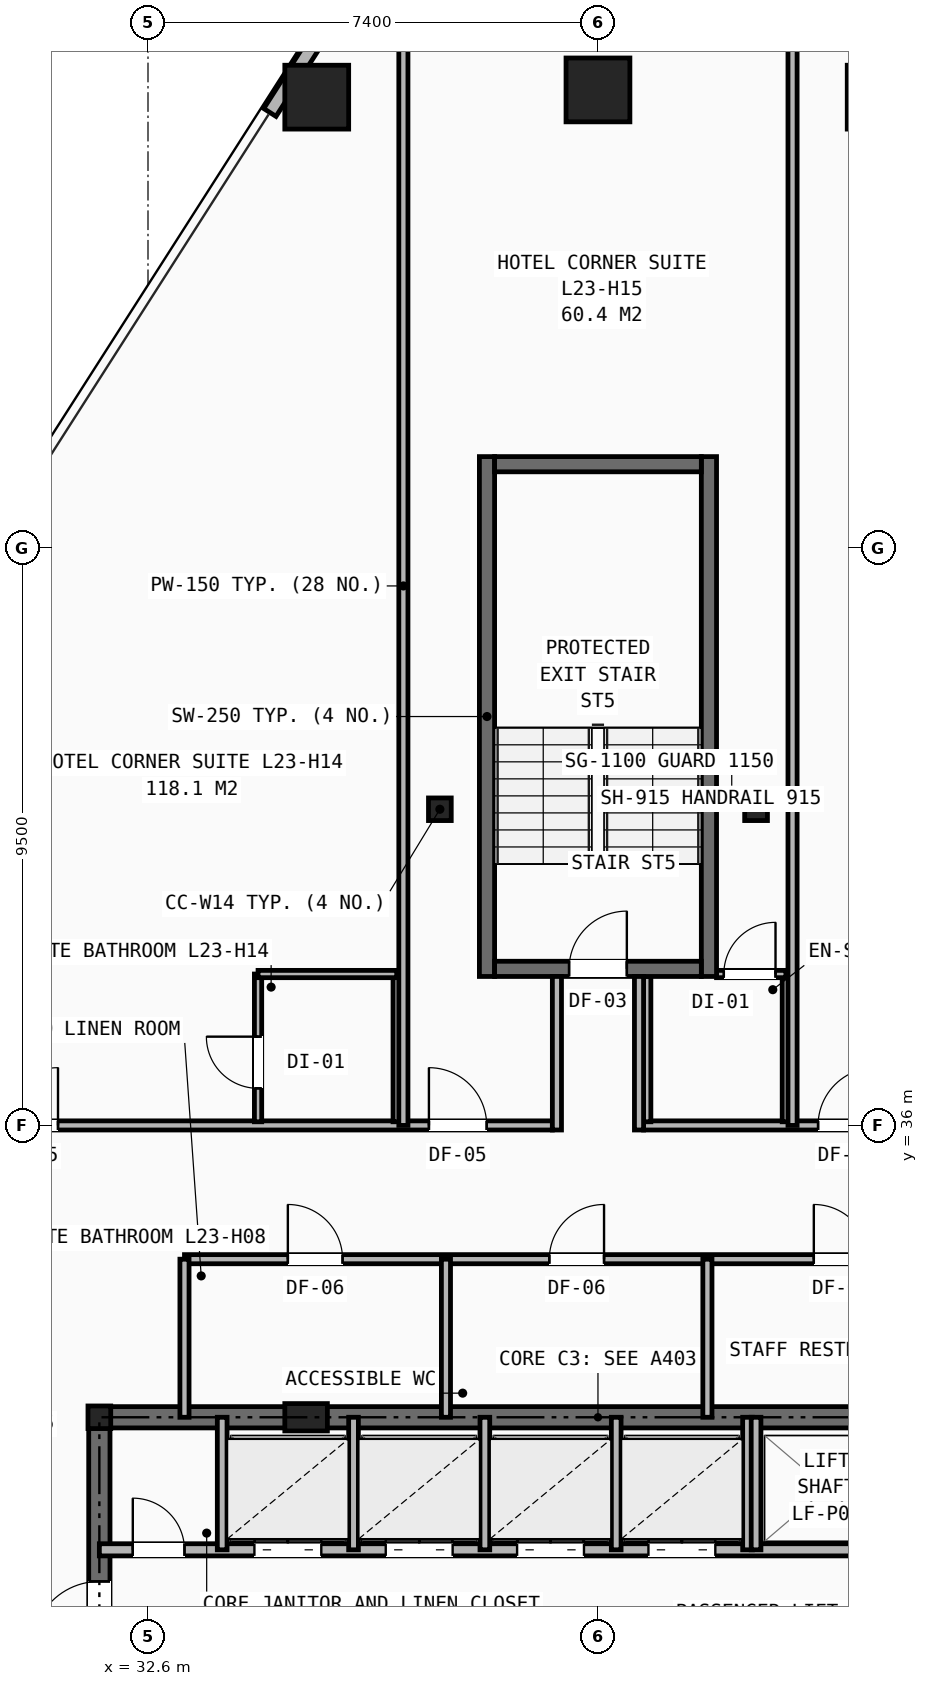
"""IFC4 building model, lengths in metres.
Left out: names, types, materials, properties, quantities, classifications, styles, units other than length and angle.
Written with IfcOpenShell. Run it as: python <this file> out.ifc"""

import sys

from ifc_helpers import new_model, si_unit, direction, frame, frame_2d, origin, origin_2d, place, context, subcontext, project, spatial, rectangle, hollow_rectangle, i_section, extrude, element, fill, save


model = new_model("IFC4")
c1 = context("Model", 3, precision=1e-05, world=origin(), true_north=direction((0.0, 1.0)))
c2 = subcontext(c1, "Body", "Model", "MODEL_VIEW")
j1 = project(units=[si_unit("LENGTHUNIT", "METRE"), si_unit("PLANEANGLEUNIT", "RADIAN")], contexts=[c1])
p1 = place(None, origin())
s1 = spatial("IfcSite", under=j1, at=p1, CompositionType="ELEMENT")
p2 = place(p1, origin())
s2 = spatial("IfcBuilding", under=s1, at=p2, CompositionType="ELEMENT")
p3 = place(p2, frame((0.0, 0.0, 83.0)))
s3 = spatial("IfcBuildingStorey", under=s2, at=p3, CompositionType="ELEMENT", Elevation=83.0)
for number, where, z_axis, x_axis in (
    (1, (31.8, 31.2, 0.0), (0.0, 0.0, 1.0), (1.0, 0.0, 0.0)),
    (2, (37.4, 41.2, 0.0), (0.0, 0.0, 1.0), (1.0, 0.0, 0.0)),
    (3, (42.6, 41.2, 0.0), (0.0, 0.0, 1.0), (1.0, 0.0, 0.0)),
):
    element("IfcColumn", number, at=place(p3, frame(where, z_axis=z_axis, x_axis=x_axis)), inside=s3, PredefinedType="COLUMN", context=c2, shape_type="SweptSolid", body=[
        extrude(i_section(OverallWidth=0.374, OverallDepth=0.372, WebThickness=0.016, FlangeThickness=0.026, at=origin_2d()), origin(), (0.0, 0.0, 1.0), 3.2),
    ])
p4 = place(p3, frame((35.2, 31.2, 0.0), z_axis=(0.0, 0.0, 1.0), x_axis=(1.0, 0.0, 0.0)))
e4 = element("IfcColumn", 4, at=p4, inside=s3, PredefinedType="PILASTER", context=c2, shape_type="SweptSolid", body=[
    extrude(rectangle(XDim=0.7, YDim=0.45, at=origin_2d()), origin(), (0.0, 0.0, 1.0), 3.2),
])
for number, where, z_axis, x_axis in (
    (5, (44.625, 52.912, 0.0), (0.0, 0.0, 1.0), (1.0, 0.0, 0.0)),
    (6, (40.0, 53.031, 0.0), (0.0, 0.0, 1.0), (1.0, 0.0, 0.0)),
    (7, (35.375, 52.912, 0.0), (0.0, 0.0, 1.0), (1.0, 0.0, 0.0)),
):
    element("IfcColumn", number, at=place(p3, frame(where, z_axis=z_axis, x_axis=x_axis)), inside=s3, PredefinedType="COLUMN", context=c2, shape_type="SweptSolid", body=[
        extrude(hollow_rectangle(XDim=1.05, YDim=1.05, WallThickness=0.07, at=origin_2d()), origin(), (0.0, 0.0, 1.0), 3.2),
    ])
p5 = place(p3, frame((35.314, 53.769, 0.0), z_axis=(0.0, 0.0, 1.0), x_axis=(-0.538937912301, -0.842345491283, 0.0)))
e8 = element("IfcWall", 8, at=p5, inside=s3, PredefinedType="SHEAR", context=c2, shape_type="SweptSolid", body=[
    extrude(rectangle(XDim=1.316, YDim=0.24, at=frame_2d((0.658, 0.0))), origin(), (0.0, 0.0, 1.0), 2.253),
])
p6 = place(p3, frame((31.8, 31.2, 0.0), z_axis=(0.0, 0.0, 1.0), x_axis=(1.0, 0.0, 0.0)))
e9 = element("IfcWall", 9, at=p6, inside=s3, PredefinedType="SHEAR", context=c2, shape_type="SweptSolid", body=[
    extrude(rectangle(XDim=16.4, YDim=0.35, at=frame_2d((8.2, 0.0))), origin(), (0.0, 0.0, 1.0), 2.97),
])
p7 = place(p3, frame((31.8, 16.4, 0.0), z_axis=(0.0, 0.0, 1.0), x_axis=(0.0, 1.0, 0.0)))
e10 = element("IfcWall", 10, at=p7, inside=s3, PredefinedType="SHEAR", context=c2, shape_type="SweptSolid", body=[
    extrude(rectangle(XDim=14.8, YDim=0.35, at=frame_2d((7.4, 0.0))), origin(), (0.0, 0.0, 1.0), 2.97),
])
p8 = place(p7, frame((11.0, 0.0, 0.0)))
e11 = element("IfcOpeningElement", 11, at=p8, cuts=e10, PredefinedType="OPENING", context=c2, shape_type="SweptSolid", body=[
    extrude(rectangle(XDim=1.1, YDim=2.15, at=frame_2d((0.55, 1.075))), frame((0.0, 0.185, 0.0), z_axis=(0.0, -1.0, 0.0), x_axis=(1.0, 0.0, 0.0)), (0.0, 0.0, 1.0), 0.37),
])
p9 = place(p3, frame((31.8, 29.02, 0.0), z_axis=(0.0, 0.0, 1.0), x_axis=(1.0, 0.0, 0.0)))
e12 = element("IfcWall", 12, at=p9, inside=s3, PredefinedType="SOLIDWALL", context=c2, shape_type="SweptSolid", body=[
    extrude(rectangle(XDim=16.4, YDim=0.2, at=frame_2d((8.2, 0.0))), origin(), (0.0, 0.0, 1.0), 2.421),
])
p10 = place(p9, frame((0.55, 0.0, 0.0)))
e13 = element("IfcOpeningElement", 13, at=p10, cuts=e12, PredefinedType="OPENING", context=c2, shape_type="SweptSolid", body=[
    extrude(rectangle(XDim=0.85, YDim=2.05, at=frame_2d((0.425, 1.025))), frame((0.0, 0.11, 0.0), z_axis=(0.0, -1.0, 0.0), x_axis=(1.0, 0.0, 0.0)), (0.0, 0.0, 1.0), 0.22),
])
p11 = place(p9, frame((2.55, 0.0, 0.0)))
e14 = element("IfcOpeningElement", 14, at=p11, cuts=e12, PredefinedType="OPENING", context=c2, shape_type="SweptSolid", body=[
    extrude(rectangle(XDim=1.1, YDim=2.15, at=frame_2d((0.55, 1.075))), frame((0.0, 0.11, 0.0), z_axis=(0.0, -1.0, 0.0), x_axis=(1.0, 0.0, 0.0)), (0.0, 0.0, 1.0), 0.22),
])
p12 = place(p9, frame((4.71, 0.0, 0.0)))
e15 = element("IfcOpeningElement", 15, at=p12, cuts=e12, PredefinedType="OPENING", context=c2, shape_type="SweptSolid", body=[
    extrude(rectangle(XDim=1.1, YDim=2.15, at=frame_2d((0.55, 1.075))), frame((0.0, 0.11, 0.0), z_axis=(0.0, -1.0, 0.0), x_axis=(1.0, 0.0, 0.0)), (0.0, 0.0, 1.0), 0.22),
])
p13 = place(p9, frame((6.87, 0.0, 0.0)))
e16 = element("IfcOpeningElement", 16, at=p13, cuts=e12, PredefinedType="OPENING", context=c2, shape_type="SweptSolid", body=[
    extrude(rectangle(XDim=1.1, YDim=2.15, at=frame_2d((0.55, 1.075))), frame((0.0, 0.11, 0.0), z_axis=(0.0, -1.0, 0.0), x_axis=(1.0, 0.0, 0.0)), (0.0, 0.0, 1.0), 0.22),
])
p14 = place(p9, frame((9.03, 0.0, 0.0)))
e17 = element("IfcOpeningElement", 17, at=p14, cuts=e12, PredefinedType="OPENING", context=c2, shape_type="SweptSolid", body=[
    extrude(rectangle(XDim=1.1, YDim=2.15, at=frame_2d((0.55, 1.075))), frame((0.0, 0.11, 0.0), z_axis=(0.0, -1.0, 0.0), x_axis=(1.0, 0.0, 0.0)), (0.0, 0.0, 1.0), 0.22),
])
for number, where, z_axis, x_axis in (
    (18, (33.82, 29.02, 0.0), (0.0, 0.0, 1.0), (0.0, 1.0, 0.0)),
    (19, (35.98, 29.02, 0.0), (0.0, 0.0, 1.0), (0.0, 1.0, 0.0)),
    (20, (38.14, 29.02, 0.0), (0.0, 0.0, 1.0), (0.0, 1.0, 0.0)),
    (21, (40.3, 29.02, 0.0), (0.0, 0.0, 1.0), (0.0, 1.0, 0.0)),
    (22, (42.46, 29.02, 0.0), (0.0, 0.0, 1.0), (0.0, 1.0, 0.0)),
    (23, (42.6, 29.02, 0.0), (0.0, 0.0, 1.0), (0.0, 1.0, 0.0)),
):
    element("IfcWall", number, at=place(p3, frame(where, z_axis=z_axis, x_axis=x_axis)), inside=s3, PredefinedType="SOLIDWALL", context=c2, shape_type="SweptSolid", body=[
        extrude(rectangle(XDim=2.18, YDim=0.16, at=frame_2d((1.09, 0.0))), origin(), (0.0, 0.0, 1.0), 2.421),
    ])
p15 = place(p3, frame((33.2, 33.8, 0.0), z_axis=(0.0, 0.0, 1.0), x_axis=(1.0, 0.0, 0.0)))
e24 = element("IfcWall", 24, at=p15, inside=s3, PredefinedType="PARTITIONING", context=c2, shape_type="SweptSolid", body=[
    extrude(rectangle(XDim=13.0, YDim=0.15, at=frame_2d((6.5, 0.0))), origin(), (0.0, 0.0, 1.0), 2.97),
])
p16 = place(p15, frame((1.7, 0.0, 0.0)))
e25 = element("IfcOpeningElement", 25, at=p16, cuts=e24, PredefinedType="OPENING", context=c2, shape_type="SweptSolid", body=[
    extrude(rectangle(XDim=0.9, YDim=2.1, at=frame_2d((0.45, 1.05))), frame((0.0, 0.085, 0.0), z_axis=(0.0, -1.0, 0.0), x_axis=(1.0, 0.0, 0.0)), (0.0, 0.0, 1.0), 0.17),
])
p17 = place(p15, frame((6.0, 0.0, 0.0)))
e26 = element("IfcOpeningElement", 26, at=p17, cuts=e24, PredefinedType="OPENING", context=c2, shape_type="SweptSolid", body=[
    extrude(rectangle(XDim=0.9, YDim=2.1, at=frame_2d((0.45, 1.05))), frame((0.0, 0.085, 0.0), z_axis=(0.0, -1.0, 0.0), x_axis=(1.0, 0.0, 0.0)), (0.0, 0.0, 1.0), 0.17),
])
p18 = place(p15, frame((10.35, 0.0, 0.0)))
e27 = element("IfcOpeningElement", 27, at=p18, cuts=e24, PredefinedType="OPENING", context=c2, shape_type="SweptSolid", body=[
    extrude(rectangle(XDim=0.9, YDim=2.1, at=frame_2d((0.45, 1.05))), frame((0.0, 0.085, 0.0), z_axis=(0.0, -1.0, 0.0), x_axis=(1.0, 0.0, 0.0)), (0.0, 0.0, 1.0), 0.17),
])
for number, where, z_axis, x_axis in (
    (28, (33.2, 31.2, 0.0), (0.0, 0.0, 1.0), (0.0, 1.0, 0.0)),
    (29, (37.5, 31.2, 0.0), (0.0, 0.0, 1.0), (0.0, 1.0, 0.0)),
    (30, (41.8, 31.2, 0.0), (0.0, 0.0, 1.0), (0.0, 1.0, 0.0)),
):
    element("IfcWall", number, at=place(p3, frame(where, z_axis=z_axis, x_axis=x_axis)), inside=s3, PredefinedType="PARTITIONING", context=c2, shape_type="SweptSolid", body=[
        extrude(rectangle(XDim=2.6, YDim=0.15, at=frame_2d((1.3, 0.0))), origin(), (0.0, 0.0, 1.0), 2.421),
    ])
p19 = place(p3, frame((29.6, 36.0, 0.0), z_axis=(0.0, 0.0, 1.0), x_axis=(1.0, 0.0, 0.0)))
e31 = element("IfcWall", 31, at=p19, inside=s3, PredefinedType="PARTITIONING", context=c2, shape_type="SweptSolid", body=[
    extrude(rectangle(XDim=9.65, YDim=0.15, at=frame_2d((4.825, 0.0))), origin(), (0.0, 0.0, 1.0), 2.503),
])
p20 = place(p19, frame((0.57, 0.0, 0.0)))
e32 = element("IfcOpeningElement", 32, at=p20, cuts=e31, PredefinedType="OPENING", context=c2, shape_type="SweptSolid", body=[
    extrude(rectangle(XDim=0.95, YDim=2.1, at=frame_2d((0.475, 1.05))), frame((0.0, 0.085, 0.0), z_axis=(0.0, -1.0, 0.0), x_axis=(1.0, 0.0, 0.0)), (0.0, 0.0, 1.0), 0.17),
])
p21 = place(p19, frame((7.62, 0.0, 0.0)))
e33 = element("IfcOpeningElement", 33, at=p21, cuts=e31, PredefinedType="OPENING", context=c2, shape_type="SweptSolid", body=[
    extrude(rectangle(XDim=0.95, YDim=2.1, at=frame_2d((0.475, 1.05))), frame((0.0, 0.085, 0.0), z_axis=(0.0, -1.0, 0.0), x_axis=(1.0, 0.0, 0.0)), (0.0, 0.0, 1.0), 0.17),
])
p22 = place(p3, frame((40.75, 36.0, 0.0), z_axis=(0.0, 0.0, 1.0), x_axis=(1.0, 0.0, 0.0)))
e34 = element("IfcWall", 34, at=p22, inside=s3, PredefinedType="PARTITIONING", context=c2, shape_type="SweptSolid", body=[
    extrude(rectangle(XDim=9.65, YDim=0.15, at=frame_2d((4.825, 0.0))), origin(), (0.0, 0.0, 1.0), 2.503),
])
p23 = place(p22, frame((2.87, 0.0, 0.0)))
e35 = element("IfcOpeningElement", 35, at=p23, cuts=e34, PredefinedType="OPENING", context=c2, shape_type="SweptSolid", body=[
    extrude(rectangle(XDim=0.95, YDim=2.1, at=frame_2d((0.475, 1.05))), frame((0.0, 0.085, 0.0), z_axis=(0.0, -1.0, 0.0), x_axis=(1.0, 0.0, 0.0)), (0.0, 0.0, 1.0), 0.17),
])
p24 = place(p3, frame((34.41, 36.06, 0.0), z_axis=(0.0, 0.0, 1.0), x_axis=(0.0, 1.0, 0.0)))
e36 = element("IfcWall", 36, at=p24, inside=s3, PredefinedType="PARTITIONING", context=c2, shape_type="SweptSolid", body=[
    extrude(rectangle(XDim=2.43, YDim=0.12, at=frame_2d((1.215, 0.0))), origin(), (0.0, 0.0, 1.0), 2.97),
])
p25 = place(p24, frame((0.55, 0.0, 0.0)))
e37 = element("IfcOpeningElement", 37, at=p25, cuts=e36, PredefinedType="OPENING", context=c2, shape_type="SweptSolid", body=[
    extrude(rectangle(XDim=0.85, YDim=2.05, at=frame_2d((0.425, 1.025))), frame((0.0, 0.07, 0.0), z_axis=(0.0, -1.0, 0.0), x_axis=(1.0, 0.0, 0.0)), (0.0, 0.0, 1.0), 0.14),
])
p26 = place(p3, frame((36.69, 36.06, 0.0), z_axis=(0.0, 0.0, 1.0), x_axis=(0.0, 1.0, 0.0)))
e38 = element("IfcWall", 38, at=p26, inside=s3, PredefinedType="PARTITIONING", context=c2, shape_type="SweptSolid", body=[
    extrude(rectangle(XDim=2.43, YDim=0.12, at=frame_2d((1.215, 0.0))), origin(), (0.0, 0.0, 1.0), 2.97),
])
p27 = place(p3, frame((34.41, 38.49, 0.0), z_axis=(0.0, 0.0, 1.0), x_axis=(1.0, 0.0, 0.0)))
e39 = element("IfcWall", 39, at=p27, inside=s3, PredefinedType="PARTITIONING", context=c2, shape_type="SweptSolid", body=[
    extrude(rectangle(XDim=2.28, YDim=0.12, at=frame_2d((1.14, 0.0))), origin(), (0.0, 0.0, 1.0), 2.97),
])
p28 = place(p3, frame((36.8, 36.0, 0.0), z_axis=(0.0, 0.0, 1.0), x_axis=(0.0, 1.0, 0.0)))
e40 = element("IfcWall", 40, at=p28, inside=s3, PredefinedType="PARTITIONING", context=c2, shape_type="SweptSolid", body=[
    extrude(rectangle(XDim=17.746, YDim=0.15, at=frame_2d((8.873, 0.0))), origin(), (0.0, 0.0, 1.0), 2.258),
])
p29 = place(p3, frame((40.81, 36.06, 0.0), z_axis=(0.0, 0.0, 1.0), x_axis=(0.0, 1.0, 0.0)))
e41 = element("IfcWall", 41, at=p29, inside=s3, PredefinedType="PARTITIONING", context=c2, shape_type="SweptSolid", body=[
    extrude(rectangle(XDim=2.39, YDim=0.12, at=frame_2d((1.195, 0.0))), origin(), (0.0, 0.0, 1.0), 2.97),
])
p30 = place(p3, frame((43.09, 36.06, 0.0), z_axis=(0.0, 0.0, 1.0), x_axis=(0.0, 1.0, 0.0)))
e42 = element("IfcWall", 42, at=p30, inside=s3, PredefinedType="PARTITIONING", context=c2, shape_type="SweptSolid", body=[
    extrude(rectangle(XDim=2.43, YDim=0.12, at=frame_2d((1.215, 0.0))), origin(), (0.0, 0.0, 1.0), 2.97),
])
p31 = place(p3, frame((41.95, 38.49, 0.0), z_axis=(0.0, 0.0, 1.0), x_axis=(1.0, 0.0, 0.0)))
e43 = element("IfcWall", 43, at=p31, inside=s3, PredefinedType="PARTITIONING", context=c2, shape_type="SweptSolid", body=[
    extrude(rectangle(XDim=1.14, YDim=0.12, at=frame_2d((0.57, 0.0))), origin(), (0.0, 0.0, 1.0), 2.97),
])
p32 = place(p31, frame((0.12, 0.0, 0.0)))
e44 = element("IfcOpeningElement", 44, at=p32, cuts=e43, PredefinedType="OPENING", context=c2, shape_type="SweptSolid", body=[
    extrude(rectangle(XDim=0.85, YDim=2.05, at=frame_2d((0.425, 1.025))), frame((0.0, 0.07, 0.0), z_axis=(0.0, -1.0, 0.0), x_axis=(1.0, 0.0, 0.0)), (0.0, 0.0, 1.0), 0.14),
])
p33 = place(p3, frame((43.2, 36.0, 0.0), z_axis=(0.0, 0.0, 1.0), x_axis=(0.0, 1.0, 0.0)))
e45 = element("IfcWall", 45, at=p33, inside=s3, PredefinedType="PARTITIONING", context=c2, shape_type="SweptSolid", body=[
    extrude(rectangle(XDim=17.746, YDim=0.15, at=frame_2d((8.873, 0.0))), origin(), (0.0, 0.0, 1.0), 2.258),
])
for number, where, z_axis, x_axis in (
    (46, (38.175, 38.45, 0.0), (0.0, 0.0, 1.0), (0.0, 1.0, 0.0)),
    (47, (41.825, 38.45, 0.0), (0.0, 0.0, 1.0), (0.0, 1.0, 0.0)),
):
    element("IfcWall", number, at=place(p3, frame(where, z_axis=z_axis, x_axis=x_axis)), inside=s3, PredefinedType="SHEAR", context=c2, shape_type="SweptSolid", body=[
        extrude(rectangle(XDim=8.55, YDim=0.25, at=frame_2d((4.275, 0.0))), origin(), (0.0, 0.0, 1.0), 2.97),
    ])
p34 = place(p3, frame((38.3, 38.575, 0.0), z_axis=(0.0, 0.0, 1.0), x_axis=(1.0, 0.0, 0.0)))
e48 = element("IfcWall", 48, at=p34, inside=s3, PredefinedType="SHEAR", context=c2, shape_type="SweptSolid", body=[
    extrude(rectangle(XDim=3.4, YDim=0.25, at=frame_2d((1.7, 0.0))), origin(), (0.0, 0.0, 1.0), 2.97),
])
p35 = place(p34, frame((1.225, 0.0, 0.0)))
e49 = element("IfcOpeningElement", 49, at=p35, cuts=e48, PredefinedType="OPENING", context=c2, shape_type="SweptSolid", body=[
    extrude(rectangle(XDim=0.95, YDim=2.1, at=frame_2d((0.475, 1.05))), frame((0.0, 0.135, 0.0), z_axis=(0.0, -1.0, 0.0), x_axis=(1.0, 0.0, 0.0)), (0.0, 0.0, 1.0), 0.27),
])
p36 = place(p3, frame((38.3, 46.875, 0.0), z_axis=(0.0, 0.0, 1.0), x_axis=(1.0, 0.0, 0.0)))
e50 = element("IfcWall", 50, at=p36, inside=s3, PredefinedType="SHEAR", context=c2, shape_type="SweptSolid", body=[
    extrude(rectangle(XDim=3.4, YDim=0.25, at=frame_2d((1.7, 0.0))), origin(), (0.0, 0.0, 1.0), 2.97),
])
for number, where, z_axis, x_axis in (
    (51, (39.325, 35.925, 0.0), (0.0, 0.0, 1.0), (0.0, 1.0, 0.0)),
    (52, (40.675, 35.925, 0.0), (0.0, 0.0, 1.0), (0.0, 1.0, 0.0)),
):
    element("IfcWall", number, at=place(p3, frame(where, z_axis=z_axis, x_axis=x_axis)), inside=s3, PredefinedType="PARTITIONING", context=c2, shape_type="SweptSolid", body=[
        extrude(rectangle(XDim=2.525, YDim=0.15, at=frame_2d((1.262, 0.0))), origin(), (0.0, 0.0, 1.0), 2.97),
    ])
p37 = place(p10, origin())
e53 = element("IfcDoor", 53, at=p37, inside=s3, OperationType="SINGLE_SWING_LEFT", PredefinedType="DOOR", context=c2, shape_type="SweptSolid", body=[
    extrude(rectangle(XDim=0.85, YDim=2.05, at=frame_2d((0.425, 1.025))), frame((0.0, 0.025, 0.0), z_axis=(0.0, -1.0, 0.0), x_axis=(1.0, 0.0, 0.0)), (0.0, 0.0, 1.0), 0.05),
])
fill(e13, e53)
p38 = place(p8, origin())
e54 = element("IfcDoor", 54, at=p38, inside=s3, OperationType="SINGLE_SWING_LEFT", PredefinedType="DOOR", context=c2, shape_type="SweptSolid", body=[
    extrude(rectangle(XDim=1.1, YDim=2.15, at=frame_2d((0.55, 1.075))), frame((0.0, 0.025, 0.0), z_axis=(0.0, -1.0, 0.0), x_axis=(1.0, 0.0, 0.0)), (0.0, 0.0, 1.0), 0.05),
])
fill(e11, e54)
p39 = place(p11, origin())
e55 = element("IfcDoor", 55, at=p39, inside=s3, OperationType="DOUBLE_DOOR_SLIDING", PredefinedType="DOOR", context=c2, shape_type="SweptSolid", body=[
    extrude(rectangle(XDim=1.1, YDim=2.15, at=frame_2d((0.55, 1.075))), frame((0.0, 0.025, 0.0), z_axis=(0.0, -1.0, 0.0), x_axis=(1.0, 0.0, 0.0)), (0.0, 0.0, 1.0), 0.05),
])
fill(e14, e55)
p40 = place(p12, origin())
e56 = element("IfcDoor", 56, at=p40, inside=s3, OperationType="DOUBLE_DOOR_SLIDING", PredefinedType="DOOR", context=c2, shape_type="SweptSolid", body=[
    extrude(rectangle(XDim=1.1, YDim=2.15, at=frame_2d((0.55, 1.075))), frame((0.0, 0.025, 0.0), z_axis=(0.0, -1.0, 0.0), x_axis=(1.0, 0.0, 0.0)), (0.0, 0.0, 1.0), 0.05),
])
fill(e15, e56)
p41 = place(p13, origin())
e57 = element("IfcDoor", 57, at=p41, inside=s3, OperationType="DOUBLE_DOOR_SLIDING", PredefinedType="DOOR", context=c2, shape_type="SweptSolid", body=[
    extrude(rectangle(XDim=1.1, YDim=2.15, at=frame_2d((0.55, 1.075))), frame((0.0, 0.025, 0.0), z_axis=(0.0, -1.0, 0.0), x_axis=(1.0, 0.0, 0.0)), (0.0, 0.0, 1.0), 0.05),
])
fill(e16, e57)
p42 = place(p14, origin())
e58 = element("IfcDoor", 58, at=p42, inside=s3, OperationType="DOUBLE_DOOR_SLIDING", PredefinedType="DOOR", context=c2, shape_type="SweptSolid", body=[
    extrude(rectangle(XDim=1.1, YDim=2.15, at=frame_2d((0.55, 1.075))), frame((0.0, 0.025, 0.0), z_axis=(0.0, -1.0, 0.0), x_axis=(1.0, 0.0, 0.0)), (0.0, 0.0, 1.0), 0.05),
])
fill(e17, e58)
p43 = place(p16, origin())
e59 = element("IfcDoor", 59, at=p43, inside=s3, OperationType="SINGLE_SWING_LEFT", PredefinedType="DOOR", context=c2, shape_type="SweptSolid", body=[
    extrude(rectangle(XDim=0.9, YDim=2.1, at=frame_2d((0.45, 1.05))), frame((0.0, 0.025, 0.0), z_axis=(0.0, -1.0, 0.0), x_axis=(1.0, 0.0, 0.0)), (0.0, 0.0, 1.0), 0.05),
])
fill(e25, e59)
p44 = place(p17, origin())
e60 = element("IfcDoor", 60, at=p44, inside=s3, OperationType="SINGLE_SWING_RIGHT", PredefinedType="DOOR", context=c2, shape_type="SweptSolid", body=[
    extrude(rectangle(XDim=0.9, YDim=2.1, at=frame_2d((0.45, 1.05))), frame((0.0, 0.025, 0.0), z_axis=(0.0, -1.0, 0.0), x_axis=(1.0, 0.0, 0.0)), (0.0, 0.0, 1.0), 0.05),
])
fill(e26, e60)
p45 = place(p18, origin())
e61 = element("IfcDoor", 61, at=p45, inside=s3, OperationType="SINGLE_SWING_LEFT", PredefinedType="DOOR", context=c2, shape_type="SweptSolid", body=[
    extrude(rectangle(XDim=0.9, YDim=2.1, at=frame_2d((0.45, 1.05))), frame((0.0, 0.025, 0.0), z_axis=(0.0, -1.0, 0.0), x_axis=(1.0, 0.0, 0.0)), (0.0, 0.0, 1.0), 0.05),
])
fill(e27, e61)
p46 = place(p20, origin())
e62 = element("IfcDoor", 62, at=p46, inside=s3, OperationType="SINGLE_SWING_RIGHT", PredefinedType="DOOR", context=c2, shape_type="SweptSolid", body=[
    extrude(rectangle(XDim=0.95, YDim=2.1, at=frame_2d((0.475, 1.05))), frame((0.0, 0.025, 0.0), z_axis=(0.0, -1.0, 0.0), x_axis=(1.0, 0.0, 0.0)), (0.0, 0.0, 1.0), 0.05),
])
fill(e32, e62)
p47 = place(p25, origin())
e63 = element("IfcDoor", 63, at=p47, inside=s3, OperationType="SINGLE_SWING_RIGHT", PredefinedType="DOOR", context=c2, shape_type="SweptSolid", body=[
    extrude(rectangle(XDim=0.85, YDim=2.05, at=frame_2d((0.425, 1.025))), frame((0.0, 0.025, 0.0), z_axis=(0.0, -1.0, 0.0), x_axis=(1.0, 0.0, 0.0)), (0.0, 0.0, 1.0), 0.05),
])
fill(e37, e63)
p48 = place(p21, origin())
e64 = element("IfcDoor", 64, at=p48, inside=s3, OperationType="SINGLE_SWING_LEFT", PredefinedType="DOOR", context=c2, shape_type="SweptSolid", body=[
    extrude(rectangle(XDim=0.95, YDim=2.1, at=frame_2d((0.475, 1.05))), frame((0.0, 0.025, 0.0), z_axis=(0.0, -1.0, 0.0), x_axis=(1.0, 0.0, 0.0)), (0.0, 0.0, 1.0), 0.05),
])
fill(e33, e64)
p49 = place(p32, origin())
e65 = element("IfcDoor", 65, at=p49, inside=s3, OperationType="SINGLE_SWING_RIGHT", PredefinedType="DOOR", context=c2, shape_type="SweptSolid", body=[
    extrude(rectangle(XDim=0.85, YDim=2.05, at=frame_2d((0.425, 1.025))), frame((0.0, 0.025, 0.0), z_axis=(0.0, -1.0, 0.0), x_axis=(1.0, 0.0, 0.0)), (0.0, 0.0, 1.0), 0.05),
])
fill(e44, e65)
p50 = place(p23, origin())
e66 = element("IfcDoor", 66, at=p50, inside=s3, OperationType="SINGLE_SWING_RIGHT", PredefinedType="DOOR", context=c2, shape_type="SweptSolid", body=[
    extrude(rectangle(XDim=0.95, YDim=2.1, at=frame_2d((0.475, 1.05))), frame((0.0, 0.025, 0.0), z_axis=(0.0, -1.0, 0.0), x_axis=(1.0, 0.0, 0.0)), (0.0, 0.0, 1.0), 0.05),
])
fill(e35, e66)
p51 = place(p35, origin())
e67 = element("IfcDoor", 67, at=p51, inside=s3, OperationType="SINGLE_SWING_RIGHT", PredefinedType="DOOR", context=c2, shape_type="SweptSolid", body=[
    extrude(rectangle(XDim=0.95, YDim=2.1, at=frame_2d((0.475, 1.05))), frame((0.0, 0.025, 0.0), z_axis=(0.0, -1.0, 0.0), x_axis=(1.0, 0.0, 0.0)), (0.0, 0.0, 1.0), 0.05),
])
fill(e49, e67)
save(model, sys.argv[1])
